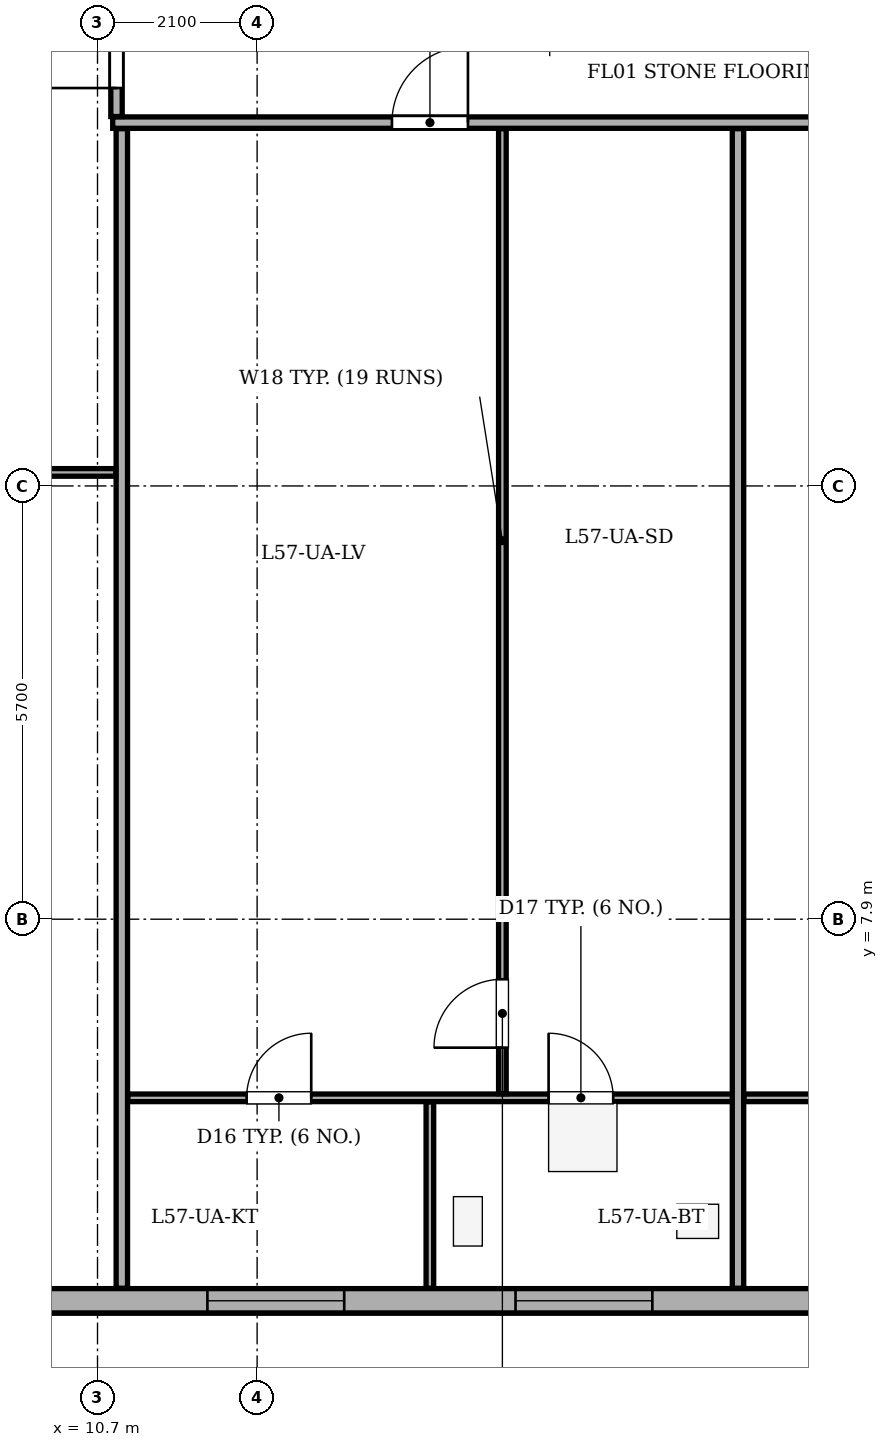
"""IFC4 building model, lengths in metres.
Left out: names, types, materials, properties, quantities, classifications, styles, units other than length and angle.
Written with IfcOpenShell. Run it as: python <this file> out.ifc"""

import sys

from ifc_helpers import new_model, si_unit, direction, frame, frame_2d, origin, place, context, subcontext, project, spatial, rectangle, extrude, element, fill, save


model = new_model("IFC4")
c1 = context("Model", 3, precision=1e-05, world=origin(), true_north=direction((0.0, 1.0)))
c2 = subcontext(c1, "Body", "Model", "MODEL_VIEW")
j1 = project(units=[si_unit("LENGTHUNIT", "METRE"), si_unit("PLANEANGLEUNIT", "RADIAN")], contexts=[c1])
p1 = place(None, origin())
s1 = spatial("IfcSite", under=j1, at=p1, CompositionType="ELEMENT")
p2 = place(p1, origin())
s2 = spatial("IfcBuilding", under=s1, at=p2, CompositionType="ELEMENT")
p3 = place(p2, frame((0.0, 0.0, 221.1)))
s3 = spatial("IfcBuildingStorey", under=s2, at=p3, CompositionType="ELEMENT", Elevation=221.1)
p4 = place(p3, frame((44.8, 2.88, 0.0), z_axis=(0.0, 0.0, 1.0), x_axis=(-1.0, 0.0, 0.0)))
e1 = element("IfcWall", 1, at=p4, inside=s3, PredefinedType="STANDARD", context=c2, shape_type="SweptSolid", body=[
    extrude(rectangle(XDim=36.0, YDim=0.32, at=frame_2d((18.0, 0.0))), origin(), (0.0, 0.0, 1.0), 2.725),
])
p5 = place(p4, frame((20.1, 0.0, 0.0)))
e2 = element("IfcOpeningElement", 2, at=p5, cuts=e1, PredefinedType="OPENING", context=c2, shape_type="SweptSolid", body=[
    extrude(rectangle(XDim=1.0, YDim=2.02, at=frame_2d((0.5, 1.01))), frame((0.0, 0.17, 0.0), z_axis=(0.0, -1.0, 0.0), x_axis=(1.0, 0.0, 0.0)), (0.0, 0.0, 1.0), 0.34),
])
p6 = place(p4, frame((1.227, 0.0, 0.75)))
e3 = element("IfcOpeningElement", 3, at=p6, cuts=e1, PredefinedType="OPENING", context=c2, shape_type="SweptSolid", body=[
    extrude(rectangle(XDim=1.8, YDim=1.7, at=frame_2d((0.9, 0.85))), frame((0.0, 0.17, 0.0), z_axis=(0.0, -1.0, 0.0), x_axis=(1.0, 0.0, 0.0)), (0.0, 0.0, 1.0), 0.34),
])
p7 = place(p4, frame((5.18, 0.0, 0.75)))
e4 = element("IfcOpeningElement", 4, at=p7, cuts=e1, PredefinedType="OPENING", context=c2, shape_type="SweptSolid", body=[
    extrude(rectangle(XDim=1.8, YDim=1.7, at=frame_2d((0.9, 0.85))), frame((0.0, 0.17, 0.0), z_axis=(0.0, -1.0, 0.0), x_axis=(1.0, 0.0, 0.0)), (0.0, 0.0, 1.0), 0.34),
])
p8 = place(p4, frame((12.548, 0.0, 0.75)))
e5 = element("IfcOpeningElement", 5, at=p8, cuts=e1, PredefinedType="OPENING", context=c2, shape_type="SweptSolid", body=[
    extrude(rectangle(XDim=1.25, YDim=1.7, at=frame_2d((0.625, 0.85))), frame((0.0, 0.17, 0.0), z_axis=(0.0, -1.0, 0.0), x_axis=(1.0, 0.0, 0.0)), (0.0, 0.0, 1.0), 0.34),
])
p9 = place(p4, frame((26.8, 0.0, 0.75)))
e6 = element("IfcOpeningElement", 6, at=p9, cuts=e1, PredefinedType="OPENING", context=c2, shape_type="SweptSolid", body=[
    extrude(rectangle(XDim=1.8, YDim=1.7, at=frame_2d((0.9, 0.85))), frame((0.0, 0.17, 0.0), z_axis=(0.0, -1.0, 0.0), x_axis=(1.0, 0.0, 0.0)), (0.0, 0.0, 1.0), 0.34),
])
p10 = place(p4, frame((30.854, 0.0, 0.75)))
e7 = element("IfcOpeningElement", 7, at=p10, cuts=e1, PredefinedType="OPENING", context=c2, shape_type="SweptSolid", body=[
    extrude(rectangle(XDim=1.8, YDim=1.7, at=frame_2d((0.9, 0.85))), frame((0.0, 0.17, 0.0), z_axis=(0.0, -1.0, 0.0), x_axis=(1.0, 0.0, 0.0)), (0.0, 0.0, 1.0), 0.34),
])
p11 = place(p4, frame((10.33, 0.0, 0.75)))
e8 = element("IfcOpeningElement", 8, at=p11, cuts=e1, PredefinedType="OPENING", context=c2, shape_type="SweptSolid", body=[
    extrude(rectangle(XDim=0.75, YDim=1.45, at=frame_2d((0.375, 0.725))), frame((0.0, 0.17, 0.0), z_axis=(0.0, -1.0, 0.0), x_axis=(1.0, 0.0, 0.0)), (0.0, 0.0, 1.0), 0.34),
])
p12 = place(p3, frame((10.9, 18.38, 0.0), z_axis=(0.0, 0.0, 1.0), x_axis=(1.0, 0.0, 0.0)))
e9 = element("IfcWall", 9, at=p12, inside=s3, PredefinedType="PARTITIONING", context=c2, shape_type="SweptSolid", body=[
    extrude(rectangle(XDim=34.02, YDim=0.15, at=frame_2d((17.01, 0.0))), origin(), (0.0, 0.0, 1.0), 3.1),
])
p13 = place(p12, frame((3.674, 0.0, 0.0)))
e10 = element("IfcOpeningElement", 10, at=p13, cuts=e9, PredefinedType="OPENING", context=c2, shape_type="SweptSolid", body=[
    extrude(rectangle(XDim=1.0, YDim=2.1, at=frame_2d((0.5, 1.05))), frame((0.0, 0.085, 0.0), z_axis=(0.0, -1.0, 0.0), x_axis=(1.0, 0.0, 0.0)), (0.0, 0.0, 1.0), 0.17),
])
p14 = place(p12, frame((12.118, 0.0, 0.0)))
e11 = element("IfcOpeningElement", 11, at=p14, cuts=e9, PredefinedType="OPENING", context=c2, shape_type="SweptSolid", body=[
    extrude(rectangle(XDim=1.0, YDim=2.1, at=frame_2d((0.5, 1.05))), frame((0.0, 0.085, 0.0), z_axis=(0.0, -1.0, 0.0), x_axis=(1.0, 0.0, 0.0)), (0.0, 0.0, 1.0), 0.17),
])
p15 = place(p12, frame((20.901, 0.0, 0.0)))
e12 = element("IfcOpeningElement", 12, at=p15, cuts=e9, PredefinedType="OPENING", context=c2, shape_type="SweptSolid", body=[
    extrude(rectangle(XDim=1.0, YDim=2.1, at=frame_2d((0.5, 1.05))), frame((0.0, 0.085, 0.0), z_axis=(0.0, -1.0, 0.0), x_axis=(1.0, 0.0, 0.0)), (0.0, 0.0, 1.0), 0.17),
])
p16 = place(p12, frame((29.346, 0.0, 0.0)))
e13 = element("IfcOpeningElement", 13, at=p16, cuts=e9, PredefinedType="OPENING", context=c2, shape_type="SweptSolid", body=[
    extrude(rectangle(XDim=1.0, YDim=2.1, at=frame_2d((0.5, 1.05))), frame((0.0, 0.085, 0.0), z_axis=(0.0, -1.0, 0.0), x_axis=(1.0, 0.0, 0.0)), (0.0, 0.0, 1.0), 0.17),
])
p17 = place(p3, frame((11.02, 3.045, 0.0), z_axis=(0.0, 0.0, 1.0), x_axis=(0.0, 1.0, 0.0)))
e14 = element("IfcWall", 14, at=p17, inside=s3, PredefinedType="PARTITIONING", context=c2, shape_type="SweptSolid", body=[
    extrude(rectangle(XDim=15.255, YDim=0.15, at=frame_2d((7.627, 0.0))), origin(), (0.0, 0.0, 1.0), 3.1),
])
p18 = place(p3, frame((11.1, 5.55, 0.0), z_axis=(0.0, 0.0, 1.0), x_axis=(1.0, 0.0, 0.0)))
e15 = element("IfcWall", 15, at=p18, inside=s3, PredefinedType="PARTITIONING", context=c2, shape_type="SweptSolid", body=[
    extrude(rectangle(XDim=8.067, YDim=0.1, at=frame_2d((4.033, 0.0))), origin(), (0.0, 0.0, 1.0), 3.1),
])
p19 = place(p18, frame((1.562, 0.0, 0.0)))
e16 = element("IfcOpeningElement", 16, at=p19, cuts=e15, PredefinedType="OPENING", context=c2, shape_type="SweptSolid", body=[
    extrude(rectangle(XDim=0.85, YDim=2.05, at=frame_2d((0.425, 1.025))), frame((0.0, 0.06, 0.0), z_axis=(0.0, -1.0, 0.0), x_axis=(1.0, 0.0, 0.0)), (0.0, 0.0, 1.0), 0.12),
])
p20 = place(p18, frame((5.535, 0.0, 0.0)))
e17 = element("IfcOpeningElement", 17, at=p20, cuts=e15, PredefinedType="OPENING", context=c2, shape_type="SweptSolid", body=[
    extrude(rectangle(XDim=0.85, YDim=2.05, at=frame_2d((0.425, 1.025))), frame((0.0, 0.06, 0.0), z_axis=(0.0, -1.0, 0.0), x_axis=(1.0, 0.0, 0.0)), (0.0, 0.0, 1.0), 0.12),
])
p21 = place(p3, frame((16.027, 5.605, 0.0), z_axis=(0.0, 0.0, 1.0), x_axis=(0.0, 1.0, 0.0)))
e18 = element("IfcWall", 18, at=p21, inside=s3, PredefinedType="PARTITIONING", context=c2, shape_type="SweptSolid", body=[
    extrude(rectangle(XDim=12.695, YDim=0.1, at=frame_2d((6.348, 0.0))), origin(), (0.0, 0.0, 1.0), 3.1),
])
p22 = place(p21, frame((0.605, 0.0, 0.0)))
e19 = element("IfcOpeningElement", 19, at=p22, cuts=e18, PredefinedType="OPENING", context=c2, shape_type="SweptSolid", body=[
    extrude(rectangle(XDim=0.9, YDim=2.05, at=frame_2d((0.45, 1.025))), frame((0.0, 0.06, 0.0), z_axis=(0.0, -1.0, 0.0), x_axis=(1.0, 0.0, 0.0)), (0.0, 0.0, 1.0), 0.12),
])
p23 = place(p3, frame((15.073, 3.045, 0.0), z_axis=(0.0, 0.0, 1.0), x_axis=(0.0, 1.0, 0.0)))
e20 = element("IfcWall", 20, at=p23, inside=s3, PredefinedType="PARTITIONING", context=c2, shape_type="SweptSolid", body=[
    extrude(rectangle(XDim=2.45, YDim=0.1, at=frame_2d((1.225, 0.0))), origin(), (0.0, 0.0, 1.0), 3.1),
])
p24 = place(p3, frame((19.127, 3.045, 0.0), z_axis=(0.0, 0.0, 1.0), x_axis=(0.0, 1.0, 0.0)))
e21 = element("IfcWall", 21, at=p24, inside=s3, PredefinedType="PARTITIONING", context=c2, shape_type="SweptSolid", body=[
    extrude(rectangle(XDim=15.255, YDim=0.15, at=frame_2d((7.627, 0.0))), origin(), (0.0, 0.0, 1.0), 3.1),
])
p25 = place(p3, frame((19.207, 5.55, 0.0), z_axis=(0.0, 0.0, 1.0), x_axis=(1.0, 0.0, 0.0)))
e22 = element("IfcWall", 22, at=p25, inside=s3, PredefinedType="PARTITIONING", context=c2, shape_type="SweptSolid", body=[
    extrude(rectangle(XDim=8.743, YDim=0.1, at=frame_2d((4.372, 0.0))), origin(), (0.0, 0.0, 1.0), 3.1),
])
p26 = place(p25, frame((1.73, 0.0, 0.0)))
e23 = element("IfcOpeningElement", 23, at=p26, cuts=e22, PredefinedType="OPENING", context=c2, shape_type="SweptSolid", body=[
    extrude(rectangle(XDim=0.85, YDim=2.05, at=frame_2d((0.425, 1.025))), frame((0.0, 0.06, 0.0), z_axis=(0.0, -1.0, 0.0), x_axis=(1.0, 0.0, 0.0)), (0.0, 0.0, 1.0), 0.12),
])
p27 = place(p25, frame((6.042, 0.0, 0.0)))
e24 = element("IfcOpeningElement", 24, at=p27, cuts=e22, PredefinedType="OPENING", context=c2, shape_type="SweptSolid", body=[
    extrude(rectangle(XDim=0.85, YDim=2.05, at=frame_2d((0.425, 1.025))), frame((0.0, 0.06, 0.0), z_axis=(0.0, -1.0, 0.0), x_axis=(1.0, 0.0, 0.0)), (0.0, 0.0, 1.0), 0.12),
])
p28 = place(p3, frame((10.95, 18.46, 0.0), z_axis=(0.0, 0.0, 1.0), x_axis=(0.0, 1.0, 0.0)))
e25 = element("IfcWall", 25, at=p28, inside=s3, PredefinedType="PARTITIONING", context=c2, shape_type="SweptSolid", body=[
    extrude(rectangle(XDim=1.79, YDim=0.15, at=frame_2d((0.895, 0.0))), origin(), (0.0, 0.0, 1.0), 3.1),
])
p29 = place(p28, frame((0.375, 0.0, 0.0)))
e26 = element("IfcOpeningElement", 26, at=p29, cuts=e25, PredefinedType="OPENING", context=c2, shape_type="SweptSolid", body=[
    extrude(rectangle(XDim=1.0, YDim=2.1, at=frame_2d((0.5, 1.05))), frame((0.0, 0.085, 0.0), z_axis=(0.0, -1.0, 0.0), x_axis=(1.0, 0.0, 0.0)), (0.0, 0.0, 1.0), 0.17),
])
p30 = place(p3, frame((4.645, 13.778, 0.0), z_axis=(0.0, 0.0, 1.0), x_axis=(1.0, 0.0, 0.0)))
e27 = element("IfcWall", 27, at=p30, inside=s3, PredefinedType="PARTITIONING", context=c2, shape_type="SweptSolid", body=[
    extrude(rectangle(XDim=6.295, YDim=0.1, at=frame_2d((3.147, 0.0))), origin(), (0.0, 0.0, 1.0), 3.1),
])
p31 = place(p30, frame((2.696, 0.0, 0.0)))
e28 = element("IfcOpeningElement", 28, at=p31, cuts=e27, PredefinedType="OPENING", context=c2, shape_type="SweptSolid", body=[
    extrude(rectangle(XDim=0.9, YDim=2.05, at=frame_2d((0.45, 1.025))), frame((0.0, 0.06, 0.0), z_axis=(0.0, -1.0, 0.0), x_axis=(1.0, 0.0, 0.0)), (0.0, 0.0, 1.0), 0.12),
])
p32 = place(p9, origin())
e29 = element("IfcWindow", 29, at=p32, inside=s3, PartitioningType="SINGLE_PANEL", PredefinedType="WINDOW", context=c2, shape_type="SweptSolid", body=[
    extrude(rectangle(XDim=1.8, YDim=1.7, at=frame_2d((0.9, 0.85))), frame((0.0, -0.01, 0.0), z_axis=(0.0, -1.0, 0.0), x_axis=(1.0, 0.0, 0.0)), (0.0, 0.0, 1.0), 0.06),
])
fill(e6, e29)
p33 = place(p10, origin())
e30 = element("IfcWindow", 30, at=p33, inside=s3, PartitioningType="SINGLE_PANEL", PredefinedType="WINDOW", context=c2, shape_type="SweptSolid", body=[
    extrude(rectangle(XDim=1.8, YDim=1.7, at=frame_2d((0.9, 0.85))), frame((0.0, -0.01, 0.0), z_axis=(0.0, -1.0, 0.0), x_axis=(1.0, 0.0, 0.0)), (0.0, 0.0, 1.0), 0.06),
])
fill(e7, e30)
p34 = place(p13, origin())
e31 = element("IfcDoor", 31, at=p34, inside=s3, OperationType="SINGLE_SWING_RIGHT", PredefinedType="DOOR", context=c2, shape_type="SweptSolid", body=[
    extrude(rectangle(XDim=1.0, YDim=2.1, at=frame_2d((0.5, 1.05))), frame((0.0, 0.025, 0.0), z_axis=(0.0, -1.0, 0.0), x_axis=(1.0, 0.0, 0.0)), (0.0, 0.0, 1.0), 0.05),
])
fill(e10, e31)
p35 = place(p22, origin())
e32 = element("IfcDoor", 32, at=p35, inside=s3, OperationType="SINGLE_SWING_LEFT", PredefinedType="DOOR", context=c2, shape_type="SweptSolid", body=[
    extrude(rectangle(XDim=0.9, YDim=2.05, at=frame_2d((0.45, 1.025))), frame((0.0, 0.025, 0.0), z_axis=(0.0, -1.0, 0.0), x_axis=(1.0, 0.0, 0.0)), (0.0, 0.0, 1.0), 0.05),
])
fill(e19, e32)
p36 = place(p19, origin())
e33 = element("IfcDoor", 33, at=p36, inside=s3, OperationType="SINGLE_SWING_RIGHT", PredefinedType="DOOR", context=c2, shape_type="SweptSolid", body=[
    extrude(rectangle(XDim=0.85, YDim=2.05, at=frame_2d((0.425, 1.025))), frame((0.0, 0.025, 0.0), z_axis=(0.0, -1.0, 0.0), x_axis=(1.0, 0.0, 0.0)), (0.0, 0.0, 1.0), 0.05),
])
fill(e16, e33)
p37 = place(p20, origin())
e34 = element("IfcDoor", 34, at=p37, inside=s3, OperationType="SINGLE_SWING_LEFT", PredefinedType="DOOR", context=c2, shape_type="SweptSolid", body=[
    extrude(rectangle(XDim=0.85, YDim=2.05, at=frame_2d((0.425, 1.025))), frame((0.0, 0.025, 0.0), z_axis=(0.0, -1.0, 0.0), x_axis=(1.0, 0.0, 0.0)), (0.0, 0.0, 1.0), 0.05),
])
fill(e17, e34)
p38 = place(p29, origin())
e35 = element("IfcDoor", 35, at=p38, inside=s3, OperationType="SINGLE_SWING_LEFT", PredefinedType="DOOR", context=c2, shape_type="SweptSolid", body=[
    extrude(rectangle(XDim=1.0, YDim=2.1, at=frame_2d((0.5, 1.05))), frame((0.0, 0.025, 0.0), z_axis=(0.0, -1.0, 0.0), x_axis=(1.0, 0.0, 0.0)), (0.0, 0.0, 1.0), 0.05),
])
fill(e26, e35)
save(model, sys.argv[1])
